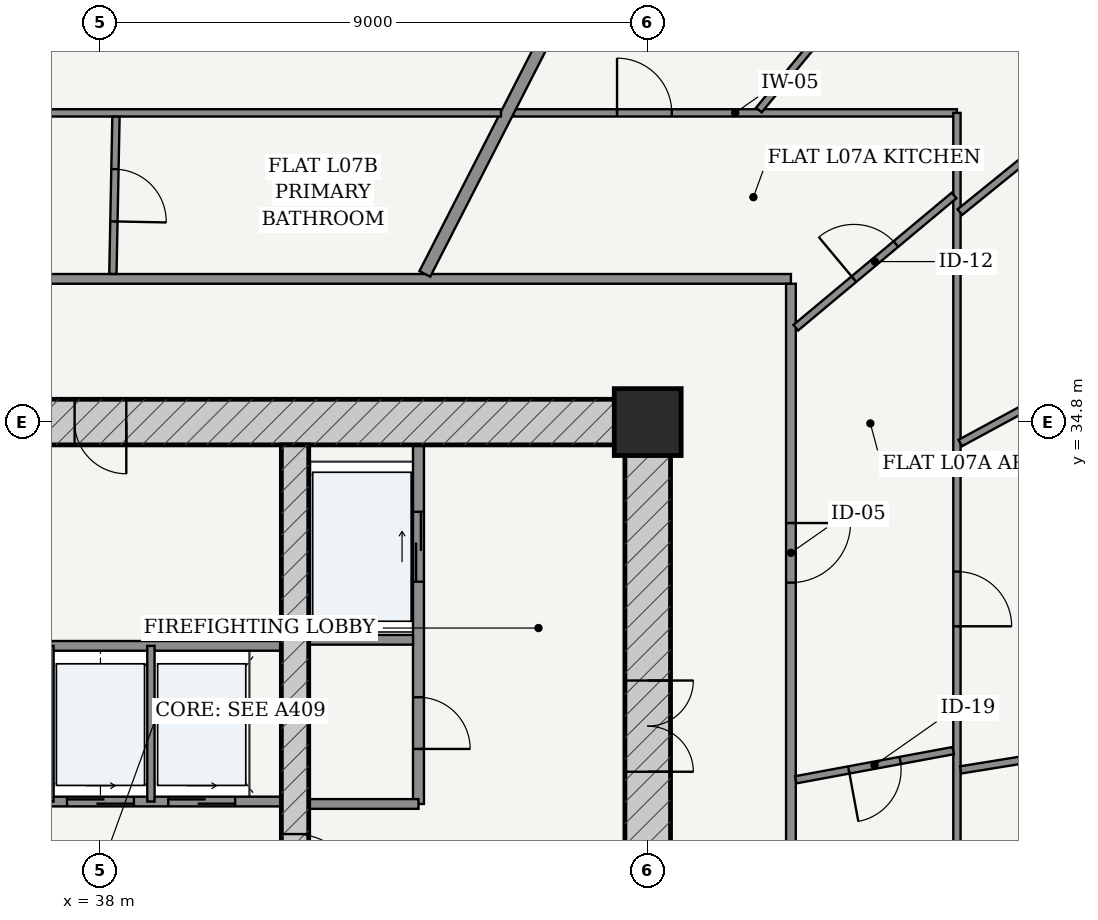
"""IFC4 building model, lengths in metres.
Left out: names, types, materials, properties, quantities, classifications, styles, units other than length and angle.
Written with IfcOpenShell. Run it as: python <this file> out.ifc"""

import sys

from ifc_helpers import new_model, si_unit, direction, frame, frame_2d, origin, origin_2d, place, context, subcontext, project, spatial, rectangle, extrude, source, transform, mapped, element, fill, save


model = new_model("IFC4")
c1 = context("Model", 3, precision=1e-05, world=origin(), true_north=direction((-0.2419218956, 0.970295726276)))
c2 = subcontext(c1, "Body", "Model", "MODEL_VIEW")
j1 = project(units=[si_unit("LENGTHUNIT", "METRE"), si_unit("PLANEANGLEUNIT", "RADIAN")], contexts=[c1])
p1 = place(None, origin())
s1 = spatial("IfcSite", under=j1, at=p1, CompositionType="ELEMENT")
p2 = place(p1, origin())
s2 = spatial("IfcBuilding", under=s1, at=p2, CompositionType="ELEMENT")
p3 = place(p2, frame((0.0, 0.0, 31.2)))
s3 = spatial("IfcBuildingStorey", under=s2, at=p3, CompositionType="ELEMENT", Elevation=31.2)
p4 = place(p3, frame((47.0, 34.8, 0.0), z_axis=(0.0, 0.0, 1.0), x_axis=(1.0, 0.0, 0.0)))
e1 = element("IfcColumn", 1, at=p4, inside=s3, PredefinedType="COLUMN", context=c2, shape_type="SweptSolid", body=[
    extrude(rectangle(XDim=1.1, YDim=1.1, at=origin_2d()), origin(), (0.0, 0.0, 1.0), 3.6),
])
p5 = place(p3, frame((28.625, 34.8, 0.0), z_axis=(0.0, 0.0, 1.0), x_axis=(1.0, 0.0, 0.0)))
e2 = element("IfcWall", 2, at=p5, inside=s3, PredefinedType="SHEAR", context=c2, shape_type="SweptSolid", body=[
    extrude(rectangle(XDim=18.75, YDim=0.75, at=frame_2d((9.375, 0.0))), origin(), (0.0, 0.0, 1.0), 3.32),
])
p6 = place(p5, frame((8.95, 0.0, 0.0)))
e3 = element("IfcOpeningElement", 3, at=p6, cuts=e2, PredefinedType="OPENING", context=c2, shape_type="SweptSolid", body=[
    extrude(rectangle(XDim=0.85, YDim=2.1, at=frame_2d((0.425, 1.05))), frame((0.0, 0.385, 0.0), z_axis=(0.0, -1.0, 0.0), x_axis=(1.0, 0.0, 0.0)), (0.0, 0.0, 1.0), 0.77),
])
p7 = place(p3, frame((47.0, 19.175, 0.0), z_axis=(0.0, 0.0, 1.0), x_axis=(0.0, 1.0, 0.0)))
e4 = element("IfcWall", 4, at=p7, inside=s3, PredefinedType="SHEAR", context=c2, shape_type="SweptSolid", body=[
    extrude(rectangle(XDim=15.25, YDim=0.75, at=frame_2d((7.625, 0.0))), origin(), (0.0, 0.0, 1.0), 3.32),
])
p8 = place(p7, frame((9.875, 0.0, 0.0)))
e5 = element("IfcOpeningElement", 5, at=p8, cuts=e4, PredefinedType="OPENING", context=c2, shape_type="SweptSolid", body=[
    extrude(rectangle(XDim=1.5, YDim=2.2, at=frame_2d((0.75, 1.1))), frame((0.0, 0.385, 0.0), z_axis=(0.0, -1.0, 0.0), x_axis=(1.0, 0.0, 0.0)), (0.0, 0.0, 1.0), 0.77),
])
p9 = place(p3, frame((41.2, 19.175, 0.0), z_axis=(0.0, 0.0, 1.0), x_axis=(0.0, 1.0, 0.0)))
e6 = element("IfcWall", 6, at=p9, inside=s3, PredefinedType="SHEAR", context=c2, shape_type="SweptSolid", body=[
    extrude(rectangle(XDim=15.25, YDim=0.45, at=frame_2d((7.625, 0.0))), origin(), (0.0, 0.0, 1.0), 3.32),
])
p10 = place(p9, frame((7.8, 0.0, 0.0)))
e7 = element("IfcOpeningElement", 7, at=p10, cuts=e6, PredefinedType="OPENING", context=c2, shape_type="SweptSolid", body=[
    extrude(rectangle(XDim=1.05, YDim=2.15, at=frame_2d((0.525, 1.075))), frame((0.0, 0.235, 0.0), z_axis=(0.0, -1.0, 0.0), x_axis=(1.0, 0.0, 0.0)), (0.0, 0.0, 1.0), 0.47),
])
p11 = place(p3, frame((43.23, 28.52, 0.0), z_axis=(0.0, 0.0, 1.0), x_axis=(0.0, 1.0, 0.0)))
e8 = element("IfcWall", 8, at=p11, inside=s3, PredefinedType="PARTITIONING", context=c2, shape_type="SweptSolid", body=[
    extrude(rectangle(XDim=5.905, YDim=0.18, at=frame_2d((2.953, 0.0))), origin(), (0.0, 0.0, 1.0), 3.32),
])
p12 = place(p11, frame((0.905, 0.0, 0.0)))
e9 = element("IfcOpeningElement", 9, at=p12, cuts=e8, PredefinedType="OPENING", context=c2, shape_type="SweptSolid", body=[
    extrude(rectangle(XDim=0.85, YDim=2.1, at=frame_2d((0.425, 1.05))), frame((0.0, 0.1, 0.0), z_axis=(0.0, -1.0, 0.0), x_axis=(1.0, 0.0, 0.0)), (0.0, 0.0, 1.0), 0.2),
])
p13 = place(p11, frame((3.655, 0.0, 0.0)))
e10 = element("IfcOpeningElement", 10, at=p13, cuts=e8, PredefinedType="OPENING", context=c2, shape_type="SweptSolid", body=[
    extrude(rectangle(XDim=1.15, YDim=2.2, at=frame_2d((0.575, 1.1))), frame((0.0, 0.1, 0.0), z_axis=(0.0, -1.0, 0.0), x_axis=(1.0, 0.0, 0.0)), (0.0, 0.0, 1.0), 0.2),
])
p14 = place(p3, frame((41.425, 31.22, 0.0), z_axis=(0.0, 0.0, 1.0), x_axis=(1.0, 0.0, 0.0)))
e11 = element("IfcWall", 11, at=p14, inside=s3, PredefinedType="PARTITIONING", context=c2, shape_type="SweptSolid", body=[
    extrude(rectangle(XDim=1.715, YDim=0.16, at=frame_2d((0.857, 0.0))), origin(), (0.0, 0.0, 1.0), 3.32),
])
p15 = place(p3, frame((41.425, 28.52, 0.0), z_axis=(0.0, 0.0, 1.0), x_axis=(1.0, 0.0, 0.0)))
e12 = element("IfcWall", 12, at=p15, inside=s3, PredefinedType="PARTITIONING", context=c2, shape_type="SweptSolid", body=[
    extrude(rectangle(XDim=1.805, YDim=0.16, at=frame_2d((0.902, 0.0))), origin(), (0.0, 0.0, 1.0), 3.32),
])
p16 = place(p3, frame((35.025, 28.56, 0.0), z_axis=(0.0, 0.0, 1.0), x_axis=(1.0, 0.0, 0.0)))
e13 = element("IfcWall", 13, at=p16, inside=s3, PredefinedType="PARTITIONING", context=c2, shape_type="SweptSolid", body=[
    extrude(rectangle(XDim=5.95, YDim=0.16, at=frame_2d((2.975, 0.0))), origin(), (0.0, 0.0, 1.0), 3.32),
])
p17 = place(p16, frame((0.76, 0.0, 0.0)))
e14 = element("IfcOpeningElement", 14, at=p17, cuts=e13, PredefinedType="OPENING", context=c2, shape_type="SweptSolid", body=[
    extrude(rectangle(XDim=1.1, YDim=2.2, at=frame_2d((0.55, 1.1))), frame((0.0, 0.09, 0.0), z_axis=(0.0, -1.0, 0.0), x_axis=(1.0, 0.0, 0.0)), (0.0, 0.0, 1.0), 0.18),
])
p18 = place(p16, frame((2.425, 0.0, 0.0)))
e15 = element("IfcOpeningElement", 15, at=p18, cuts=e13, PredefinedType="OPENING", context=c2, shape_type="SweptSolid", body=[
    extrude(rectangle(XDim=1.1, YDim=2.2, at=frame_2d((0.55, 1.1))), frame((0.0, 0.09, 0.0), z_axis=(0.0, -1.0, 0.0), x_axis=(1.0, 0.0, 0.0)), (0.0, 0.0, 1.0), 0.18),
])
p19 = place(p16, frame((4.09, 0.0, 0.0)))
e16 = element("IfcOpeningElement", 16, at=p19, cuts=e13, PredefinedType="OPENING", context=c2, shape_type="SweptSolid", body=[
    extrude(rectangle(XDim=1.1, YDim=2.2, at=frame_2d((0.55, 1.1))), frame((0.0, 0.09, 0.0), z_axis=(0.0, -1.0, 0.0), x_axis=(1.0, 0.0, 0.0)), (0.0, 0.0, 1.0), 0.18),
])
p20 = place(p3, frame((35.025, 31.12, 0.0), z_axis=(0.0, 0.0, 1.0), x_axis=(1.0, 0.0, 0.0)))
e17 = element("IfcWall", 17, at=p20, inside=s3, PredefinedType="PARTITIONING", context=c2, shape_type="SweptSolid", body=[
    extrude(rectangle(XDim=5.95, YDim=0.16, at=frame_2d((2.975, 0.0))), origin(), (0.0, 0.0, 1.0), 3.32),
])
for number, where, z_axis, x_axis in (
    (18, (37.17, 28.56, 0.0), (0.0, 0.0, 1.0), (0.0, 1.0, 0.0)),
    (19, (38.83, 28.56, 0.0), (0.0, 0.0, 1.0), (0.0, 1.0, 0.0)),
):
    element("IfcWall", number, at=place(p3, frame(where, z_axis=z_axis, x_axis=x_axis)), inside=s3, PredefinedType="PARTITIONING", context=c2, shape_type="SweptSolid", body=[
        extrude(rectangle(XDim=2.56, YDim=0.12, at=frame_2d((1.28, 0.0))), origin(), (0.0, 0.0, 1.0), 3.32),
    ])
p21 = place(p3, frame((26.645, 37.155, 0.0), z_axis=(0.0, 0.0, 1.0), x_axis=(1.0, 0.0, 0.0)))
e20 = element("IfcWall", 20, at=p21, inside=s3, PredefinedType="PARTITIONING", context=c2, shape_type="SweptSolid", body=[
    extrude(rectangle(XDim=22.71, YDim=0.16, at=frame_2d((11.355, 0.0))), origin(), (0.0, 0.0, 1.0), 2.688),
])
p22 = place(p21, frame((7.446, 0.0, 0.0)))
e21 = element("IfcOpeningElement", 21, at=p22, cuts=e20, PredefinedType="OPENING", context=c2, shape_type="SweptSolid", body=[
    extrude(rectangle(XDim=0.98, YDim=2.2, at=frame_2d((0.49, 1.1))), frame((0.0, 0.09, 0.0), z_axis=(0.0, -1.0, 0.0), x_axis=(1.0, 0.0, 0.0)), (0.0, 0.0, 1.0), 0.18),
])
p23 = place(p3, frame((49.355, 16.525, 0.0), z_axis=(0.0, 0.0, 1.0), x_axis=(0.0, 1.0, 0.0)))
e22 = element("IfcWall", 22, at=p23, inside=s3, PredefinedType="PARTITIONING", context=c2, shape_type="SweptSolid", body=[
    extrude(rectangle(XDim=20.55, YDim=0.16, at=frame_2d((10.275, 0.0))), origin(), (0.0, 0.0, 1.0), 2.688),
])
p24 = place(p23, frame((15.635, 0.0, 0.0)))
e23 = element("IfcOpeningElement", 23, at=p24, cuts=e22, PredefinedType="OPENING", context=c2, shape_type="SweptSolid", body=[
    extrude(rectangle(XDim=0.98, YDim=2.2, at=frame_2d((0.49, 1.1))), frame((0.0, 0.09, 0.0), z_axis=(0.0, -1.0, 0.0), x_axis=(1.0, 0.0, 0.0)), (0.0, 0.0, 1.0), 0.18),
])
p25 = place(p3, frame((44.791, 39.885, 0.0), z_axis=(0.0, 0.0, 1.0), x_axis=(1.0, 0.0, 0.0)))
e24 = element("IfcWall", 24, at=p25, inside=s3, PredefinedType="PARTITIONING", context=c2, shape_type="SweptSolid", body=[
    extrude(rectangle(XDim=7.294, YDim=0.12, at=frame_2d((3.647, 0.0))), origin(), (0.0, 0.0, 1.0), 2.688),
])
p26 = place(p25, frame((1.705, 0.0, 0.0)))
e25 = element("IfcOpeningElement", 25, at=p26, cuts=e24, PredefinedType="OPENING", context=c2, shape_type="SweptSolid", body=[
    extrude(rectangle(XDim=0.9, YDim=2.15, at=frame_2d((0.45, 1.075))), frame((0.0, 0.07, 0.0), z_axis=(0.0, -1.0, 0.0), x_axis=(1.0, 0.0, 0.0)), (0.0, 0.0, 1.0), 0.14),
])
p27 = place(p3, frame((52.085, 39.885, 0.0), z_axis=(0.0, 0.0, 1.0), x_axis=(0.0, -1.0, 0.0)))
e26 = element("IfcWall", 26, at=p27, inside=s3, PredefinedType="PARTITIONING", context=c2, shape_type="SweptSolid", body=[
    extrude(rectangle(XDim=15.253, YDim=0.12, at=frame_2d((7.627, 0.0))), origin(), (0.0, 0.0, 1.0), 2.688),
])
p28 = place(p27, frame((7.543, 0.0, 0.0)))
e27 = element("IfcOpeningElement", 27, at=p28, cuts=e26, PredefinedType="OPENING", context=c2, shape_type="SweptSolid", body=[
    extrude(rectangle(XDim=0.9, YDim=2.15, at=frame_2d((0.45, 1.075))), frame((0.0, 0.07, 0.0), z_axis=(0.0, -1.0, 0.0), x_axis=(1.0, 0.0, 0.0)), (0.0, 0.0, 1.0), 0.14),
])
p29 = place(p3, frame((52.146, 29.08, 0.0), z_axis=(0.0, 0.0, 1.0), x_axis=(0.987255773689, 0.159141563768, 0.0)))
e28 = element("IfcWall", 28, at=p29, inside=s3, PredefinedType="PARTITIONING", context=c2, shape_type="SweptSolid", body=[
    extrude(rectangle(XDim=14.359, YDim=0.12, at=frame_2d((7.18, 0.0))), origin(), (0.0, 0.0, 1.0), 2.688),
])
p30 = place(p29, frame((5.659, 0.0, 0.0)))
e29 = element("IfcOpeningElement", 29, at=p30, cuts=e28, PredefinedType="OPENING", context=c2, shape_type="SweptSolid", body=[
    extrude(rectangle(XDim=0.9, YDim=2.15, at=frame_2d((0.45, 1.075))), frame((0.0, 0.07, 0.0), z_axis=(0.0, -1.0, 0.0), x_axis=(1.0, 0.0, 0.0)), (0.0, 0.0, 1.0), 0.14),
])
p31 = place(p3, frame((52.139, 34.456, 0.0), z_axis=(0.0, 0.0, 1.0), x_axis=(0.879372452045, 0.476134529922, 0.0)))
e30 = element("IfcWall", 30, at=p31, inside=s3, PredefinedType="PARTITIONING", context=c2, shape_type="SweptSolid", body=[
    extrude(rectangle(XDim=11.219, YDim=0.12, at=frame_2d((5.61, 0.0))), origin(), (0.0, 0.0, 1.0), 2.688),
])
p32 = place(p31, frame((4.102, 0.0, 0.0)))
e31 = element("IfcOpeningElement", 31, at=p32, cuts=e30, PredefinedType="OPENING", context=c2, shape_type="SweptSolid", body=[
    extrude(rectangle(XDim=0.9, YDim=2.15, at=frame_2d((0.45, 1.075))), frame((0.0, 0.07, 0.0), z_axis=(0.0, -1.0, 0.0), x_axis=(1.0, 0.0, 0.0)), (0.0, 0.0, 1.0), 0.14),
])
p33 = place(p3, frame((52.133, 38.253, 0.0), z_axis=(0.0, 0.0, 1.0), x_axis=(0.776936623447, 0.629578814087, 0.0)))
e32 = element("IfcWall", 32, at=p33, inside=s3, PredefinedType="PARTITIONING", context=c2, shape_type="SweptSolid", body=[
    extrude(rectangle(XDim=8.136, YDim=0.12, at=frame_2d((4.068, 0.0))), origin(), (0.0, 0.0, 1.0), 2.762),
])
p34 = place(p33, frame((3.618, 0.0, 0.0)))
e33 = element("IfcOpeningElement", 33, at=p34, cuts=e32, PredefinedType="OPENING", context=c2, shape_type="SweptSolid", body=[
    extrude(rectangle(XDim=0.9, YDim=2.15, at=frame_2d((0.45, 1.075))), frame((0.0, 0.07, 0.0), z_axis=(0.0, -1.0, 0.0), x_axis=(1.0, 0.0, 0.0)), (0.0, 0.0, 1.0), 0.14),
])
p35 = place(p3, frame((48.829, 39.933, 0.0), z_axis=(0.0, 0.0, 1.0), x_axis=(0.636192172227, 0.771530634516, 0.0)))
e34 = element("IfcWall", 34, at=p35, inside=s3, PredefinedType="PARTITIONING", context=c2, shape_type="SweptSolid", body=[
    extrude(rectangle(XDim=8.186, YDim=0.12, at=frame_2d((4.093, 0.0))), origin(), (0.0, 0.0, 1.0), 2.688),
])
p36 = place(p3, frame((49.435, 28.918, 0.0), z_axis=(0.0, 0.0, 1.0), x_axis=(0.983277085422, 0.182115823818, 0.0)))
e35 = element("IfcWall", 35, at=p36, inside=s3, PredefinedType="PARTITIONING", context=c2, shape_type="SweptSolid", body=[
    extrude(rectangle(XDim=2.633, YDim=0.12, at=frame_2d((1.316, 0.0))), origin(), (0.0, 0.0, 1.0), 3.32),
])
p37 = place(p36, frame((0.886, 0.0, 0.0)))
e36 = element("IfcOpeningElement", 36, at=p37, cuts=e35, PredefinedType="OPENING", context=c2, shape_type="SweptSolid", body=[
    extrude(rectangle(XDim=0.86, YDim=2.15, at=frame_2d((0.43, 1.075))), frame((0.0, 0.07, 0.0), z_axis=(0.0, -1.0, 0.0), x_axis=(1.0, 0.0, 0.0)), (0.0, 0.0, 1.0), 0.14),
])
p38 = place(p3, frame((49.435, 36.353, 0.0), z_axis=(0.0, 0.0, 1.0), x_axis=(0.76742398833, 0.641139939589, 0.0)))
e37 = element("IfcWall", 37, at=p38, inside=s3, PredefinedType="PARTITIONING", context=c2, shape_type="SweptSolid", body=[
    extrude(rectangle(XDim=3.391, YDim=0.12, at=frame_2d((1.695, 0.0))), origin(), (0.0, 0.0, 1.0), 2.999),
])
p39 = place(p38, frame((1.246, 0.0, 0.0)))
e38 = element("IfcOpeningElement", 38, at=p39, cuts=e37, PredefinedType="OPENING", context=c2, shape_type="SweptSolid", body=[
    extrude(rectangle(XDim=0.9, YDim=2.15, at=frame_2d((0.45, 1.075))), frame((0.0, 0.07, 0.0), z_axis=(0.0, -1.0, 0.0), x_axis=(1.0, 0.0, 0.0)), (0.0, 0.0, 1.0), 0.14),
])
p40 = place(p3, frame((43.335, 37.237, 0.0), z_axis=(0.0, 0.0, 1.0), x_axis=(0.455148959499, 0.890415310216, 0.0)))
e39 = element("IfcWall", 39, at=p40, inside=s3, PredefinedType="PARTITIONING", context=c2, shape_type="SweptSolid", body=[
    extrude(rectangle(XDim=12.598, YDim=0.2, at=frame_2d((6.299, 0.0))), origin(), (0.0, 0.0, 1.0), 2.762),
])
p41 = place(p3, frame((23.915, 39.885, 0.0), z_axis=(0.0, 0.0, 1.0), x_axis=(1.0, 0.0, 0.0)))
e40 = element("IfcWall", 40, at=p41, inside=s3, PredefinedType="PARTITIONING", context=c2, shape_type="SweptSolid", body=[
    extrude(rectangle(XDim=20.671, YDim=0.12, at=frame_2d((10.336, 0.0))), origin(), (0.0, 0.0, 1.0), 2.688),
])
p42 = place(p41, frame((10.444, 0.0, 0.0)))
e41 = element("IfcOpeningElement", 41, at=p42, cuts=e40, PredefinedType="OPENING", context=c2, shape_type="SweptSolid", body=[
    extrude(rectangle(XDim=0.9, YDim=2.15, at=frame_2d((0.45, 1.075))), frame((0.0, 0.07, 0.0), z_axis=(0.0, -1.0, 0.0), x_axis=(1.0, 0.0, 0.0)), (0.0, 0.0, 1.0), 0.14),
])
p43 = place(p3, frame((38.205, 37.237, 0.0), z_axis=(0.0, 0.0, 1.0), x_axis=(0.019633676934, 0.999807240787, 0.0)))
e42 = element("IfcWall", 42, at=p43, inside=s3, PredefinedType="PARTITIONING", context=c2, shape_type="SweptSolid", body=[
    extrude(rectangle(XDim=2.586, YDim=0.12, at=frame_2d((1.293, 0.0))), origin(), (0.0, 0.0, 1.0), 3.32),
])
p44 = place(p43, frame((0.863, 0.0, 0.0)))
e43 = element("IfcOpeningElement", 43, at=p44, cuts=e42, PredefinedType="OPENING", context=c2, shape_type="SweptSolid", body=[
    extrude(rectangle(XDim=0.86, YDim=2.15, at=frame_2d((0.43, 1.075))), frame((0.0, 0.07, 0.0), z_axis=(0.0, -1.0, 0.0), x_axis=(1.0, 0.0, 0.0)), (0.0, 0.0, 1.0), 0.14),
])
m1 = source(origin(), c2, "Body", "SweptSolid", [
    extrude(rectangle(XDim=1.5, YDim=2.2, at=frame_2d((0.75, 1.1))), frame((0.0, 0.025, 0.0), z_axis=(0.0, -1.0, 0.0), x_axis=(1.0, 0.0, 0.0)), (0.0, 0.0, 1.0), 0.05),
])
p45 = place(p8, frame((1.5, 0.0, 0.0), z_axis=(0.0, 0.0, 1.0), x_axis=(-1.0, 0.0, 0.0)))
e44 = element("IfcDoor", 44, at=p45, inside=s3, OperationType="DOUBLE_DOOR_SINGLE_SWING", PredefinedType="DOOR", context=c2, shape_type="MappedRepresentation", body=[
    mapped(m1, transform((0.0, 0.0, 0.0), scale=1.0)),
])
fill(e5, e44)
m2 = source(origin(), c2, "Body", "SweptSolid", [
    extrude(rectangle(XDim=1.05, YDim=2.15, at=frame_2d((0.525, 1.075))), frame((0.0, 0.025, 0.0), z_axis=(0.0, -1.0, 0.0), x_axis=(1.0, 0.0, 0.0)), (0.0, 0.0, 1.0), 0.05),
])
p46 = place(p10, frame((1.05, 0.0, 0.0), z_axis=(0.0, 0.0, 1.0), x_axis=(-1.0, 0.0, 0.0)))
e45 = element("IfcDoor", 45, at=p46, inside=s3, OperationType="SINGLE_SWING_RIGHT", PredefinedType="DOOR", context=c2, shape_type="MappedRepresentation", body=[
    mapped(m2, transform((0.0, 0.0, 0.0), scale=1.0)),
])
fill(e7, e45)
m3 = source(origin(), c2, "Body", "SweptSolid", [
    extrude(rectangle(XDim=0.85, YDim=2.1, at=frame_2d((0.425, 1.05))), frame((0.0, 0.025, 0.0), z_axis=(0.0, -1.0, 0.0), x_axis=(1.0, 0.0, 0.0)), (0.0, 0.0, 1.0), 0.05),
])
p47 = place(p12, frame((0.85, 0.0, 0.0), z_axis=(0.0, 0.0, 1.0), x_axis=(-1.0, 0.0, 0.0)))
e46 = element("IfcDoor", 46, at=p47, inside=s3, OperationType="SINGLE_SWING_RIGHT", PredefinedType="DOOR", context=c2, shape_type="MappedRepresentation", body=[
    mapped(m3, transform((0.0, 0.0, 0.0), scale=1.0)),
])
fill(e9, e46)
p48 = place(p6, frame((0.85, 0.0, 0.0), z_axis=(0.0, 0.0, 1.0), x_axis=(-1.0, 0.0, 0.0)))
e47 = element("IfcDoor", 47, at=p48, inside=s3, OperationType="SINGLE_SWING_LEFT", PredefinedType="DOOR", context=c2, shape_type="MappedRepresentation", body=[
    mapped(m3, transform((0.0, 0.0, 0.0), scale=1.0)),
])
fill(e3, e47)
m4 = source(origin(), c2, "Body", "SweptSolid", [
    extrude(rectangle(XDim=1.15, YDim=2.2, at=frame_2d((0.575, 1.1))), frame((0.0, 0.025, 0.0), z_axis=(0.0, -1.0, 0.0), x_axis=(1.0, 0.0, 0.0)), (0.0, 0.0, 1.0), 0.05),
])
p49 = place(p13, origin())
e48 = element("IfcDoor", 48, at=p49, inside=s3, OperationType="DOUBLE_DOOR_SLIDING", PredefinedType="DOOR", context=c2, shape_type="MappedRepresentation", body=[
    mapped(m4, transform((0.0, 0.0, 0.0), scale=1.0)),
])
fill(e10, e48)
m5 = source(origin(), c2, "Body", "SweptSolid", [
    extrude(rectangle(XDim=1.1, YDim=2.2, at=frame_2d((0.55, 1.1))), frame((0.0, 0.025, 0.0), z_axis=(0.0, -1.0, 0.0), x_axis=(1.0, 0.0, 0.0)), (0.0, 0.0, 1.0), 0.05),
])
p50 = place(p18, origin())
e49 = element("IfcDoor", 49, at=p50, inside=s3, OperationType="DOUBLE_DOOR_SLIDING", PredefinedType="DOOR", context=c2, shape_type="MappedRepresentation", body=[
    mapped(m5, transform((0.0, 0.0, 0.0), scale=1.0)),
])
fill(e15, e49)
p51 = place(p19, origin())
e50 = element("IfcDoor", 50, at=p51, inside=s3, OperationType="DOUBLE_DOOR_SLIDING", PredefinedType="DOOR", context=c2, shape_type="MappedRepresentation", body=[
    mapped(m5, transform((0.0, 0.0, 0.0), scale=1.0)),
])
fill(e16, e50)
m6 = source(origin(), c2, "Body", "SweptSolid", [
    extrude(rectangle(XDim=0.98, YDim=2.2, at=frame_2d((0.49, 1.1))), frame((0.0, 0.025, 0.0), z_axis=(0.0, -1.0, 0.0), x_axis=(1.0, 0.0, 0.0)), (0.0, 0.0, 1.0), 0.05),
])
p52 = place(p24, frame((0.98, 0.0, 0.0), z_axis=(0.0, 0.0, 1.0), x_axis=(-1.0, 0.0, 0.0)))
e51 = element("IfcDoor", 51, at=p52, inside=s3, OperationType="SINGLE_SWING_LEFT", PredefinedType="DOOR", context=c2, shape_type="MappedRepresentation", body=[
    mapped(m6, transform((0.0, 0.0, 0.0), scale=1.0)),
])
fill(e23, e51)
m7 = source(origin(), c2, "Body", "SweptSolid", [
    extrude(rectangle(XDim=0.86, YDim=2.15, at=frame_2d((0.43, 1.075))), frame((0.0, 0.025, 0.0), z_axis=(0.0, -1.0, 0.0), x_axis=(1.0, 0.0, 0.0)), (0.0, 0.0, 1.0), 0.05),
])
p53 = place(p37, frame((0.86, 0.0, 0.0), z_axis=(0.0, 0.0, 1.0), x_axis=(-1.0, 0.0, 0.0)))
e52 = element("IfcDoor", 52, at=p53, inside=s3, OperationType="SINGLE_SWING_RIGHT", PredefinedType="DOOR", context=c2, shape_type="MappedRepresentation", body=[
    mapped(m7, transform((0.0, 0.0, 0.0), scale=1.0)),
])
fill(e36, e52)
m8 = source(origin(), c2, "Body", "SweptSolid", [
    extrude(rectangle(XDim=0.9, YDim=2.15, at=frame_2d((0.45, 1.075))), frame((0.0, 0.025, 0.0), z_axis=(0.0, -1.0, 0.0), x_axis=(1.0, 0.0, 0.0)), (0.0, 0.0, 1.0), 0.05),
])
p54 = place(p39, origin())
e53 = element("IfcDoor", 53, at=p54, inside=s3, OperationType="SINGLE_SWING_LEFT", PredefinedType="DOOR", context=c2, shape_type="MappedRepresentation", body=[
    mapped(m8, transform((0.0, 0.0, 0.0), scale=1.0)),
])
fill(e38, e53)
p55 = place(p28, origin())
e54 = element("IfcDoor", 54, at=p55, inside=s3, OperationType="SINGLE_SWING_RIGHT", PredefinedType="DOOR", context=c2, shape_type="MappedRepresentation", body=[
    mapped(m8, transform((0.0, 0.0, 0.0), scale=1.0)),
])
fill(e27, e54)
p56 = place(p26, origin())
e55 = element("IfcDoor", 55, at=p56, inside=s3, OperationType="SINGLE_SWING_LEFT", PredefinedType="DOOR", context=c2, shape_type="MappedRepresentation", body=[
    mapped(m8, transform((0.0, 0.0, 0.0), scale=1.0)),
])
fill(e25, e55)
p57 = place(p44, frame((0.86, 0.0, 0.0), z_axis=(0.0, 0.0, 1.0), x_axis=(-1.0, 0.0, 0.0)))
e56 = element("IfcDoor", 56, at=p57, inside=s3, OperationType="SINGLE_SWING_RIGHT", PredefinedType="DOOR", context=c2, shape_type="MappedRepresentation", body=[
    mapped(m7, transform((0.0, 0.0, 0.0), scale=1.0)),
])
fill(e43, e56)
save(model, sys.argv[1])
